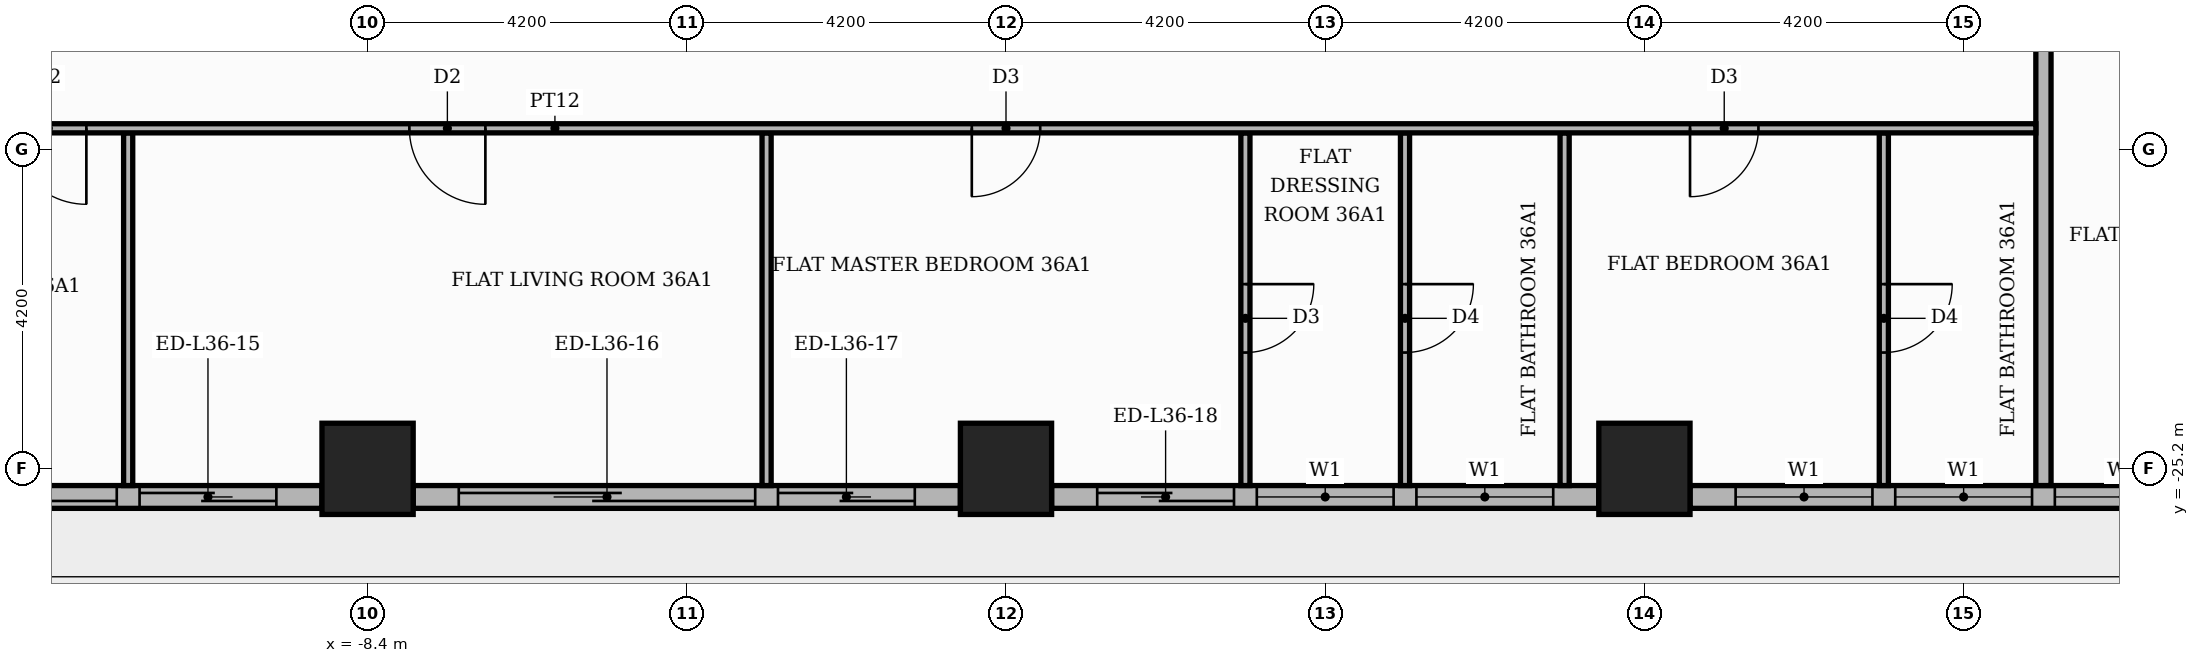
"""IFC4 building model, lengths in metres.
Left out: names, types, materials, properties, quantities, classifications, styles, units other than length and angle.
Written with IfcOpenShell. Run it as: python <this file> out.ifc"""

import sys

from ifc_helpers import new_model, si_unit, direction, frame, frame_2d, origin, origin_2d, place, context, subcontext, project, spatial, rectangle, extrude, element, fill, save


model = new_model("IFC4")
c1 = context("Model", 3, precision=1e-05, world=origin(), true_north=direction((0.0, 1.0)))
c2 = subcontext(c1, "Body", "Model", "MODEL_VIEW")
j1 = project(units=[si_unit("LENGTHUNIT", "METRE"), si_unit("PLANEANGLEUNIT", "RADIAN")], contexts=[c1])
p1 = place(None, origin())
s1 = spatial("IfcSite", under=j1, at=p1, CompositionType="ELEMENT")
p2 = place(p1, origin())
s2 = spatial("IfcBuilding", under=s1, at=p2, CompositionType="ELEMENT")
p3 = place(p2, frame((0.0, 0.0, 153.3)))
s3 = spatial("IfcBuildingStorey", under=s2, at=p3, CompositionType="ELEMENT", Elevation=153.3)
for number, where, z_axis, x_axis in (
    (1, (0.0, -25.2, 0.0), (0.0, 0.0, 1.0), (1.0, 0.0, 0.0)),
    (2, (8.4, -25.2, 0.0), (0.0, 0.0, 1.0), (1.0, 0.0, 0.0)),
    (3, (-8.4, -25.2, 0.0), (0.0, 0.0, 1.0), (1.0, 0.0, 0.0)),
):
    element("IfcColumn", number, at=place(p3, frame(where, z_axis=z_axis, x_axis=x_axis)), inside=s3, PredefinedType="COLUMN", context=c2, shape_type="SweptSolid", body=[
        extrude(rectangle(XDim=1.2, YDim=1.2, at=origin_2d()), origin(), (0.0, 0.0, 1.0), 3.9),
    ])
p4 = place(p3, frame((-16.2, -25.57, 0.0), z_axis=(0.0, 0.0, 1.0), x_axis=(1.0, 0.0, 0.0)))
e4 = element("IfcWall", 4, at=p4, inside=s3, PredefinedType="STANDARD", context=c2, shape_type="SweptSolid", body=[
    extrude(rectangle(XDim=7.2, YDim=0.3, at=frame_2d((3.6, 0.0))), origin(), (0.0, 0.0, 1.0), 3.48),
])
p5 = place(p4, frame((0.6, 0.0, 0.0)))
e5 = element("IfcOpeningElement", 5, at=p5, cuts=e4, PredefinedType="OPENING", context=c2, shape_type="SweptSolid", body=[
    extrude(rectangle(XDim=3.9, YDim=2.4, at=frame_2d((1.95, 1.2))), frame((0.0, 0.16, 0.0), z_axis=(0.0, -1.0, 0.0), x_axis=(1.0, 0.0, 0.0)), (0.0, 0.0, 1.0), 0.32),
])
p6 = place(p4, frame((4.8, 0.0, 0.0)))
e6 = element("IfcOpeningElement", 6, at=p6, cuts=e4, PredefinedType="OPENING", context=c2, shape_type="SweptSolid", body=[
    extrude(rectangle(XDim=1.8, YDim=2.4, at=frame_2d((0.9, 1.2))), frame((0.0, 0.16, 0.0), z_axis=(0.0, -1.0, 0.0), x_axis=(1.0, 0.0, 0.0)), (0.0, 0.0, 1.0), 0.32),
])
p7 = place(p3, frame((-7.8, -25.57, 0.0), z_axis=(0.0, 0.0, 1.0), x_axis=(1.0, 0.0, 0.0)))
e7 = element("IfcWall", 7, at=p7, inside=s3, PredefinedType="STANDARD", context=c2, shape_type="SweptSolid", body=[
    extrude(rectangle(XDim=7.2, YDim=0.3, at=frame_2d((3.6, 0.0))), origin(), (0.0, 0.0, 1.0), 3.48),
])
p8 = place(p7, frame((0.6, 0.0, 0.0)))
e8 = element("IfcOpeningElement", 8, at=p8, cuts=e7, PredefinedType="OPENING", context=c2, shape_type="SweptSolid", body=[
    extrude(rectangle(XDim=3.9, YDim=2.4, at=frame_2d((1.95, 1.2))), frame((0.0, 0.16, 0.0), z_axis=(0.0, -1.0, 0.0), x_axis=(1.0, 0.0, 0.0)), (0.0, 0.0, 1.0), 0.32),
])
p9 = place(p7, frame((4.8, 0.0, 0.0)))
e9 = element("IfcOpeningElement", 9, at=p9, cuts=e7, PredefinedType="OPENING", context=c2, shape_type="SweptSolid", body=[
    extrude(rectangle(XDim=1.8, YDim=2.4, at=frame_2d((0.9, 1.2))), frame((0.0, 0.16, 0.0), z_axis=(0.0, -1.0, 0.0), x_axis=(1.0, 0.0, 0.0)), (0.0, 0.0, 1.0), 0.32),
])
p10 = place(p3, frame((0.6, -25.57, 0.0), z_axis=(0.0, 0.0, 1.0), x_axis=(1.0, 0.0, 0.0)))
e10 = element("IfcWall", 10, at=p10, inside=s3, PredefinedType="STANDARD", context=c2, shape_type="SweptSolid", body=[
    extrude(rectangle(XDim=7.2, YDim=0.3, at=frame_2d((3.6, 0.0))), origin(), (0.0, 0.0, 1.0), 3.48),
])
p11 = place(p10, frame((0.6, 0.0, 0.0)))
e11 = element("IfcOpeningElement", 11, at=p11, cuts=e10, PredefinedType="OPENING", context=c2, shape_type="SweptSolid", body=[
    extrude(rectangle(XDim=1.8, YDim=2.4, at=frame_2d((0.9, 1.2))), frame((0.0, 0.16, 0.0), z_axis=(0.0, -1.0, 0.0), x_axis=(1.0, 0.0, 0.0)), (0.0, 0.0, 1.0), 0.32),
])
p12 = place(p10, frame((2.7, 0.0, 0.9)))
e12 = element("IfcOpeningElement", 12, at=p12, cuts=e10, PredefinedType="OPENING", context=c2, shape_type="SweptSolid", body=[
    extrude(rectangle(XDim=1.8, YDim=2.1, at=frame_2d((0.9, 1.05))), frame((0.0, 0.16, 0.0), z_axis=(0.0, -1.0, 0.0), x_axis=(1.0, 0.0, 0.0)), (0.0, 0.0, 1.0), 0.32),
])
p13 = place(p10, frame((4.8, 0.0, 0.9)))
e13 = element("IfcOpeningElement", 13, at=p13, cuts=e10, PredefinedType="OPENING", context=c2, shape_type="SweptSolid", body=[
    extrude(rectangle(XDim=1.8, YDim=2.1, at=frame_2d((0.9, 1.05))), frame((0.0, 0.16, 0.0), z_axis=(0.0, -1.0, 0.0), x_axis=(1.0, 0.0, 0.0)), (0.0, 0.0, 1.0), 0.32),
])
p14 = place(p3, frame((9.0, -25.57, 0.0), z_axis=(0.0, 0.0, 1.0), x_axis=(1.0, 0.0, 0.0)))
e14 = element("IfcWall", 14, at=p14, inside=s3, PredefinedType="STANDARD", context=c2, shape_type="SweptSolid", body=[
    extrude(rectangle(XDim=7.2, YDim=0.3, at=frame_2d((3.6, 0.0))), origin(), (0.0, 0.0, 1.0), 3.48),
])
p15 = place(p14, frame((0.6, 0.0, 0.9)))
e15 = element("IfcOpeningElement", 15, at=p15, cuts=e14, PredefinedType="OPENING", context=c2, shape_type="SweptSolid", body=[
    extrude(rectangle(XDim=1.8, YDim=2.1, at=frame_2d((0.9, 1.05))), frame((0.0, 0.16, 0.0), z_axis=(0.0, -1.0, 0.0), x_axis=(1.0, 0.0, 0.0)), (0.0, 0.0, 1.0), 0.32),
])
p16 = place(p14, frame((2.7, 0.0, 0.9)))
e16 = element("IfcOpeningElement", 16, at=p16, cuts=e14, PredefinedType="OPENING", context=c2, shape_type="SweptSolid", body=[
    extrude(rectangle(XDim=1.8, YDim=2.1, at=frame_2d((0.9, 1.05))), frame((0.0, 0.16, 0.0), z_axis=(0.0, -1.0, 0.0), x_axis=(1.0, 0.0, 0.0)), (0.0, 0.0, 1.0), 0.32),
])
p17 = place(p14, frame((4.8, 0.0, 0.9)))
e17 = element("IfcOpeningElement", 17, at=p17, cuts=e14, PredefinedType="OPENING", context=c2, shape_type="SweptSolid", body=[
    extrude(rectangle(XDim=1.8, YDim=2.1, at=frame_2d((0.9, 1.05))), frame((0.0, 0.16, 0.0), z_axis=(0.0, -1.0, 0.0), x_axis=(1.0, 0.0, 0.0)), (0.0, 0.0, 1.0), 0.32),
])
for number, where, z_axis, x_axis in (
    (18, (-11.55, -25.42, 0.0), (0.0, 0.0, 1.0), (0.0, 1.0, 0.0)),
    (19, (-3.15, -25.42, 0.0), (0.0, 0.0, 1.0), (0.0, 1.0, 0.0)),
):
    element("IfcWall", number, at=place(p3, frame(where, z_axis=z_axis, x_axis=x_axis)), inside=s3, PredefinedType="PARTITIONING", context=c2, shape_type="SweptSolid", body=[
        extrude(rectangle(XDim=4.64, YDim=0.12, at=frame_2d((2.32, 0.0))), origin(), (0.0, 0.0, 1.0), 3.48),
    ])
p18 = place(p3, frame((3.15, -25.42, 0.0), z_axis=(0.0, 0.0, 1.0), x_axis=(0.0, 1.0, 0.0)))
e20 = element("IfcWall", 20, at=p18, inside=s3, PredefinedType="PARTITIONING", context=c2, shape_type="SweptSolid", body=[
    extrude(rectangle(XDim=4.64, YDim=0.12, at=frame_2d((2.32, 0.0))), origin(), (0.0, 0.0, 1.0), 3.48),
])
p19 = place(p18, frame((1.75, 0.0, 0.0)))
e21 = element("IfcOpeningElement", 21, at=p19, cuts=e20, PredefinedType="OPENING", context=c2, shape_type="SweptSolid", body=[
    extrude(rectangle(XDim=0.9, YDim=2.1, at=frame_2d((0.45, 1.05))), frame((0.0, 0.07, 0.0), z_axis=(0.0, -1.0, 0.0), x_axis=(1.0, 0.0, 0.0)), (0.0, 0.0, 1.0), 0.14),
])
p20 = place(p3, frame((5.25, -25.42, 0.0), z_axis=(0.0, 0.0, 1.0), x_axis=(0.0, 1.0, 0.0)))
e22 = element("IfcWall", 22, at=p20, inside=s3, PredefinedType="PARTITIONING", context=c2, shape_type="SweptSolid", body=[
    extrude(rectangle(XDim=4.64, YDim=0.12, at=frame_2d((2.32, 0.0))), origin(), (0.0, 0.0, 1.0), 3.48),
])
p21 = place(p20, frame((1.75, 0.0, 0.0)))
e23 = element("IfcOpeningElement", 23, at=p21, cuts=e22, PredefinedType="OPENING", context=c2, shape_type="SweptSolid", body=[
    extrude(rectangle(XDim=0.9, YDim=2.1, at=frame_2d((0.45, 1.05))), frame((0.0, 0.07, 0.0), z_axis=(0.0, -1.0, 0.0), x_axis=(1.0, 0.0, 0.0)), (0.0, 0.0, 1.0), 0.14),
])
p22 = place(p3, frame((7.35, -25.42, 0.0), z_axis=(0.0, 0.0, 1.0), x_axis=(0.0, 1.0, 0.0)))
e24 = element("IfcWall", 24, at=p22, inside=s3, PredefinedType="PARTITIONING", context=c2, shape_type="SweptSolid", body=[
    extrude(rectangle(XDim=4.64, YDim=0.12, at=frame_2d((2.32, 0.0))), origin(), (0.0, 0.0, 1.0), 3.48),
])
p23 = place(p3, frame((11.55, -25.42, 0.0), z_axis=(0.0, 0.0, 1.0), x_axis=(0.0, 1.0, 0.0)))
e25 = element("IfcWall", 25, at=p23, inside=s3, PredefinedType="PARTITIONING", context=c2, shape_type="SweptSolid", body=[
    extrude(rectangle(XDim=4.64, YDim=0.12, at=frame_2d((2.32, 0.0))), origin(), (0.0, 0.0, 1.0), 3.48),
])
p24 = place(p23, frame((1.75, 0.0, 0.0)))
e26 = element("IfcOpeningElement", 26, at=p24, cuts=e25, PredefinedType="OPENING", context=c2, shape_type="SweptSolid", body=[
    extrude(rectangle(XDim=0.9, YDim=2.1, at=frame_2d((0.45, 1.05))), frame((0.0, 0.07, 0.0), z_axis=(0.0, -1.0, 0.0), x_axis=(1.0, 0.0, 0.0)), (0.0, 0.0, 1.0), 0.14),
])
p25 = place(p3, frame((13.65, -25.42, 0.0), z_axis=(0.0, 0.0, 1.0), x_axis=(0.0, 1.0, 0.0)))
e27 = element("IfcWall", 27, at=p25, inside=s3, PredefinedType="PARTITIONING", context=c2, shape_type="SweptSolid", body=[
    extrude(rectangle(XDim=11.67, YDim=0.2, at=frame_2d((5.835, 0.0))), origin(), (0.0, 0.0, 1.0), 3.48),
])
p26 = place(p3, frame((-25.42, -20.72, 0.0), z_axis=(0.0, 0.0, 1.0), x_axis=(1.0, 0.0, 0.0)))
e28 = element("IfcWall", 28, at=p26, inside=s3, PredefinedType="PARTITIONING", context=c2, shape_type="SweptSolid", body=[
    extrude(rectangle(XDim=38.97, YDim=0.12, at=frame_2d((19.485, 0.0))), origin(), (0.0, 0.0, 1.0), 3.48),
])
p27 = place(p26, frame((12.32, 0.0, 0.0)))
e29 = element("IfcOpeningElement", 29, at=p27, cuts=e28, PredefinedType="OPENING", context=c2, shape_type="SweptSolid", body=[
    extrude(rectangle(XDim=1.0, YDim=2.1, at=frame_2d((0.5, 1.05))), frame((0.0, 0.07, 0.0), z_axis=(0.0, -1.0, 0.0), x_axis=(1.0, 0.0, 0.0)), (0.0, 0.0, 1.0), 0.14),
])
p28 = place(p26, frame((17.57, 0.0, 0.0)))
e30 = element("IfcOpeningElement", 30, at=p28, cuts=e28, PredefinedType="OPENING", context=c2, shape_type="SweptSolid", body=[
    extrude(rectangle(XDim=1.0, YDim=2.1, at=frame_2d((0.5, 1.05))), frame((0.0, 0.07, 0.0), z_axis=(0.0, -1.0, 0.0), x_axis=(1.0, 0.0, 0.0)), (0.0, 0.0, 1.0), 0.14),
])
p29 = place(p26, frame((24.97, 0.0, 0.0)))
e31 = element("IfcOpeningElement", 31, at=p29, cuts=e28, PredefinedType="OPENING", context=c2, shape_type="SweptSolid", body=[
    extrude(rectangle(XDim=0.9, YDim=2.1, at=frame_2d((0.45, 1.05))), frame((0.0, 0.07, 0.0), z_axis=(0.0, -1.0, 0.0), x_axis=(1.0, 0.0, 0.0)), (0.0, 0.0, 1.0), 0.14),
])
p30 = place(p26, frame((34.42, 0.0, 0.0)))
e32 = element("IfcOpeningElement", 32, at=p30, cuts=e28, PredefinedType="OPENING", context=c2, shape_type="SweptSolid", body=[
    extrude(rectangle(XDim=0.9, YDim=2.1, at=frame_2d((0.45, 1.05))), frame((0.0, 0.07, 0.0), z_axis=(0.0, -1.0, 0.0), x_axis=(1.0, 0.0, 0.0)), (0.0, 0.0, 1.0), 0.14),
])
p31 = place(p5, origin())
e33 = element("IfcDoor", 33, at=p31, inside=s3, OperationType="SLIDING_TO_LEFT", PredefinedType="DOOR", context=c2, shape_type="SweptSolid", body=[
    extrude(rectangle(XDim=3.9, YDim=2.4, at=frame_2d((1.95, 1.2))), frame((0.0, 0.025, 0.0), z_axis=(0.0, -1.0, 0.0), x_axis=(1.0, 0.0, 0.0)), (0.0, 0.0, 1.0), 0.05),
])
fill(e5, e33)
p32 = place(p6, origin())
e34 = element("IfcDoor", 34, at=p32, inside=s3, OperationType="SLIDING_TO_RIGHT", PredefinedType="DOOR", context=c2, shape_type="SweptSolid", body=[
    extrude(rectangle(XDim=1.8, YDim=2.4, at=frame_2d((0.9, 1.2))), frame((0.0, 0.025, 0.0), z_axis=(0.0, -1.0, 0.0), x_axis=(1.0, 0.0, 0.0)), (0.0, 0.0, 1.0), 0.05),
])
fill(e6, e34)
p33 = place(p8, origin())
e35 = element("IfcDoor", 35, at=p33, inside=s3, OperationType="SLIDING_TO_LEFT", PredefinedType="DOOR", context=c2, shape_type="SweptSolid", body=[
    extrude(rectangle(XDim=3.9, YDim=2.4, at=frame_2d((1.95, 1.2))), frame((0.0, 0.025, 0.0), z_axis=(0.0, -1.0, 0.0), x_axis=(1.0, 0.0, 0.0)), (0.0, 0.0, 1.0), 0.05),
])
fill(e8, e35)
p34 = place(p9, origin())
e36 = element("IfcDoor", 36, at=p34, inside=s3, OperationType="SLIDING_TO_RIGHT", PredefinedType="DOOR", context=c2, shape_type="SweptSolid", body=[
    extrude(rectangle(XDim=1.8, YDim=2.4, at=frame_2d((0.9, 1.2))), frame((0.0, 0.025, 0.0), z_axis=(0.0, -1.0, 0.0), x_axis=(1.0, 0.0, 0.0)), (0.0, 0.0, 1.0), 0.05),
])
fill(e9, e36)
p35 = place(p11, origin())
e37 = element("IfcDoor", 37, at=p35, inside=s3, OperationType="SLIDING_TO_LEFT", PredefinedType="DOOR", context=c2, shape_type="SweptSolid", body=[
    extrude(rectangle(XDim=1.8, YDim=2.4, at=frame_2d((0.9, 1.2))), frame((0.0, 0.025, 0.0), z_axis=(0.0, -1.0, 0.0), x_axis=(1.0, 0.0, 0.0)), (0.0, 0.0, 1.0), 0.05),
])
fill(e11, e37)
p36 = place(p12, origin())
e38 = element("IfcWindow", 38, at=p36, inside=s3, PartitioningType="SINGLE_PANEL", PredefinedType="WINDOW", context=c2, shape_type="SweptSolid", body=[
    extrude(rectangle(XDim=1.8, YDim=2.1, at=frame_2d((0.9, 1.05))), frame((0.0, 0.03, 0.0), z_axis=(0.0, -1.0, 0.0), x_axis=(1.0, 0.0, 0.0)), (0.0, 0.0, 1.0), 0.06),
])
fill(e12, e38)
p37 = place(p13, origin())
e39 = element("IfcWindow", 39, at=p37, inside=s3, PartitioningType="SINGLE_PANEL", PredefinedType="WINDOW", context=c2, shape_type="SweptSolid", body=[
    extrude(rectangle(XDim=1.8, YDim=2.1, at=frame_2d((0.9, 1.05))), frame((0.0, 0.03, 0.0), z_axis=(0.0, -1.0, 0.0), x_axis=(1.0, 0.0, 0.0)), (0.0, 0.0, 1.0), 0.06),
])
fill(e13, e39)
p38 = place(p15, origin())
e40 = element("IfcWindow", 40, at=p38, inside=s3, PartitioningType="SINGLE_PANEL", PredefinedType="WINDOW", context=c2, shape_type="SweptSolid", body=[
    extrude(rectangle(XDim=1.8, YDim=2.1, at=frame_2d((0.9, 1.05))), frame((0.0, 0.03, 0.0), z_axis=(0.0, -1.0, 0.0), x_axis=(1.0, 0.0, 0.0)), (0.0, 0.0, 1.0), 0.06),
])
fill(e15, e40)
p39 = place(p16, origin())
e41 = element("IfcWindow", 41, at=p39, inside=s3, PartitioningType="SINGLE_PANEL", PredefinedType="WINDOW", context=c2, shape_type="SweptSolid", body=[
    extrude(rectangle(XDim=1.8, YDim=2.1, at=frame_2d((0.9, 1.05))), frame((0.0, 0.03, 0.0), z_axis=(0.0, -1.0, 0.0), x_axis=(1.0, 0.0, 0.0)), (0.0, 0.0, 1.0), 0.06),
])
fill(e16, e41)
p40 = place(p17, origin())
e42 = element("IfcWindow", 42, at=p40, inside=s3, PartitioningType="SINGLE_PANEL", PredefinedType="WINDOW", context=c2, shape_type="SweptSolid", body=[
    extrude(rectangle(XDim=1.8, YDim=2.1, at=frame_2d((0.9, 1.05))), frame((0.0, 0.03, 0.0), z_axis=(0.0, -1.0, 0.0), x_axis=(1.0, 0.0, 0.0)), (0.0, 0.0, 1.0), 0.06),
])
fill(e17, e42)
p41 = place(p27, frame((1.0, 0.0, 0.0), z_axis=(0.0, 0.0, 1.0), x_axis=(-1.0, 0.0, 0.0)))
e43 = element("IfcDoor", 43, at=p41, inside=s3, OperationType="SINGLE_SWING_RIGHT", PredefinedType="DOOR", context=c2, shape_type="SweptSolid", body=[
    extrude(rectangle(XDim=1.0, YDim=2.1, at=frame_2d((0.5, 1.05))), frame((0.0, 0.025, 0.0), z_axis=(0.0, -1.0, 0.0), x_axis=(1.0, 0.0, 0.0)), (0.0, 0.0, 1.0), 0.05),
])
fill(e29, e43)
p42 = place(p28, frame((1.0, 0.0, 0.0), z_axis=(0.0, 0.0, 1.0), x_axis=(-1.0, 0.0, 0.0)))
e44 = element("IfcDoor", 44, at=p42, inside=s3, OperationType="SINGLE_SWING_RIGHT", PredefinedType="DOOR", context=c2, shape_type="SweptSolid", body=[
    extrude(rectangle(XDim=1.0, YDim=2.1, at=frame_2d((0.5, 1.05))), frame((0.0, 0.025, 0.0), z_axis=(0.0, -1.0, 0.0), x_axis=(1.0, 0.0, 0.0)), (0.0, 0.0, 1.0), 0.05),
])
fill(e30, e44)
p43 = place(p29, frame((0.9, 0.0, 0.0), z_axis=(0.0, 0.0, 1.0), x_axis=(-1.0, 0.0, 0.0)))
e45 = element("IfcDoor", 45, at=p43, inside=s3, OperationType="SINGLE_SWING_LEFT", PredefinedType="DOOR", context=c2, shape_type="SweptSolid", body=[
    extrude(rectangle(XDim=0.9, YDim=2.1, at=frame_2d((0.45, 1.05))), frame((0.0, 0.025, 0.0), z_axis=(0.0, -1.0, 0.0), x_axis=(1.0, 0.0, 0.0)), (0.0, 0.0, 1.0), 0.05),
])
fill(e31, e45)
p44 = place(p19, frame((0.9, 0.0, 0.0), z_axis=(0.0, 0.0, 1.0), x_axis=(-1.0, 0.0, 0.0)))
e46 = element("IfcDoor", 46, at=p44, inside=s3, OperationType="SINGLE_SWING_RIGHT", PredefinedType="DOOR", context=c2, shape_type="SweptSolid", body=[
    extrude(rectangle(XDim=0.9, YDim=2.1, at=frame_2d((0.45, 1.05))), frame((0.0, 0.025, 0.0), z_axis=(0.0, -1.0, 0.0), x_axis=(1.0, 0.0, 0.0)), (0.0, 0.0, 1.0), 0.05),
])
fill(e21, e46)
p45 = place(p21, frame((0.9, 0.0, 0.0), z_axis=(0.0, 0.0, 1.0), x_axis=(-1.0, 0.0, 0.0)))
e47 = element("IfcDoor", 47, at=p45, inside=s3, OperationType="SINGLE_SWING_RIGHT", PredefinedType="DOOR", context=c2, shape_type="SweptSolid", body=[
    extrude(rectangle(XDim=0.9, YDim=2.1, at=frame_2d((0.45, 1.05))), frame((0.0, 0.025, 0.0), z_axis=(0.0, -1.0, 0.0), x_axis=(1.0, 0.0, 0.0)), (0.0, 0.0, 1.0), 0.05),
])
fill(e23, e47)
p46 = place(p30, frame((0.9, 0.0, 0.0), z_axis=(0.0, 0.0, 1.0), x_axis=(-1.0, 0.0, 0.0)))
e48 = element("IfcDoor", 48, at=p46, inside=s3, OperationType="SINGLE_SWING_LEFT", PredefinedType="DOOR", context=c2, shape_type="SweptSolid", body=[
    extrude(rectangle(XDim=0.9, YDim=2.1, at=frame_2d((0.45, 1.05))), frame((0.0, 0.025, 0.0), z_axis=(0.0, -1.0, 0.0), x_axis=(1.0, 0.0, 0.0)), (0.0, 0.0, 1.0), 0.05),
])
fill(e32, e48)
p47 = place(p24, frame((0.9, 0.0, 0.0), z_axis=(0.0, 0.0, 1.0), x_axis=(-1.0, 0.0, 0.0)))
e49 = element("IfcDoor", 49, at=p47, inside=s3, OperationType="SINGLE_SWING_RIGHT", PredefinedType="DOOR", context=c2, shape_type="SweptSolid", body=[
    extrude(rectangle(XDim=0.9, YDim=2.1, at=frame_2d((0.45, 1.05))), frame((0.0, 0.025, 0.0), z_axis=(0.0, -1.0, 0.0), x_axis=(1.0, 0.0, 0.0)), (0.0, 0.0, 1.0), 0.05),
])
fill(e26, e49)
save(model, sys.argv[1])
